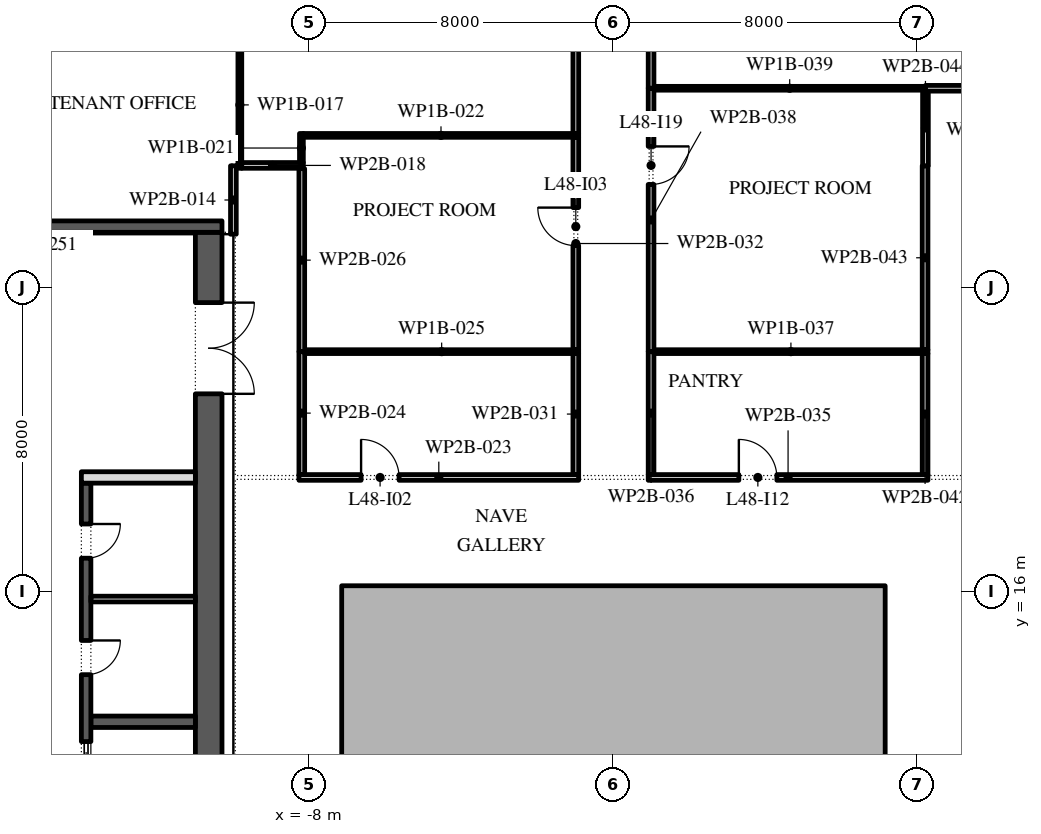
"""IFC4 building model, lengths in metres.
Left out: names, types, materials, properties, quantities, classifications, styles, units other than length and angle.
Written with IfcOpenShell. Run it as: python <this file> out.ifc"""

import sys

from ifc_helpers import new_model, si_unit, direction, frame, frame_2d, origin, place, context, subcontext, project, spatial, polyline, rectangle, outline, extrude, element, fill, save


model = new_model("IFC4")
c1 = context("Model", 3, precision=1e-05, world=origin(), true_north=direction((0.0, 1.0)))
c2 = subcontext(c1, "Body", "Model", "MODEL_VIEW")
j1 = project(units=[si_unit("LENGTHUNIT", "METRE"), si_unit("PLANEANGLEUNIT", "RADIAN")], contexts=[c1])
p1 = place(None, origin())
s1 = spatial("IfcSite", under=j1, at=p1, CompositionType="ELEMENT")
p2 = place(p1, origin())
s2 = spatial("IfcBuilding", under=s1, at=p2, CompositionType="ELEMENT")
p3 = place(p2, frame((0.0, 0.0, 217.8)))
s3 = spatial("IfcBuildingStorey", under=s2, at=p3, CompositionType="ELEMENT", Elevation=217.8)
p4 = place(p3, origin())
e1 = element("IfcWall", 1, at=p4, inside=s3, PredefinedType="STANDARD", context=c2, shape_type="SweptSolid", body=[
    extrude(outline(polyline([(-7.15, -2.15), (7.15, -2.15), (7.15, 16.15), (-7.15, 16.15), (-7.15, -2.15)]), holes=[polyline([(-7.0, -2.0), (-7.0, 16.0), (7.0, 16.0), (7.0, -2.0), (-7.0, -2.0)])]), origin(), (0.0, 0.0, 1.0), 3.95),
])
p5 = place(p3, frame((-10.65, -2.45, 0.0), z_axis=(0.0, 0.0, 1.0), x_axis=(0.0, 1.0, 0.0)))
e2 = element("IfcWall", 2, at=p5, inside=s3, PredefinedType="SHEAR", context=c2, shape_type="SweptSolid", body=[
    extrude(rectangle(XDim=27.9, YDim=0.7, at=frame_2d((13.95, 0.0))), origin(), (0.0, 0.0, 1.0), 3.95),
])
p6 = place(p5, frame((23.65, 0.0, 0.0)))
e3 = element("IfcOpeningElement", 3, at=p6, cuts=e2, PredefinedType="OPENING", context=c2, shape_type="SweptSolid", body=[
    extrude(rectangle(XDim=2.4, YDim=2.1, at=frame_2d((1.2, 1.05))), frame((0.0, 0.36, 0.0), z_axis=(0.0, -1.0, 0.0), x_axis=(1.0, 0.0, 0.0)), (0.0, 0.0, 1.0), 0.72),
])
p7 = place(p5, frame((1.087, 0.0, 0.0)))
e4 = element("IfcOpeningElement", 4, at=p7, cuts=e2, PredefinedType="OPENING", context=c2, shape_type="SweptSolid", body=[
    extrude(rectangle(XDim=0.9, YDim=2.1, at=frame_2d((0.45, 1.05))), frame((0.0, 0.36, 0.0), z_axis=(0.0, -1.0, 0.0), x_axis=(1.0, 0.0, 0.0)), (0.0, 0.0, 1.0), 0.72),
])
p8 = place(p5, frame((4.262, 0.0, 0.0)))
e5 = element("IfcOpeningElement", 5, at=p8, cuts=e2, PredefinedType="OPENING", context=c2, shape_type="SweptSolid", body=[
    extrude(rectangle(XDim=1.0, YDim=2.1, at=frame_2d((0.5, 1.05))), frame((0.0, 0.36, 0.0), z_axis=(0.0, -1.0, 0.0), x_axis=(1.0, 0.0, 0.0)), (0.0, 0.0, 1.0), 0.72),
])
p9 = place(p3, frame((-21.7, 25.6, 0.0), z_axis=(0.0, 0.0, 1.0), x_axis=(1.0, 0.0, 0.0)))
e6 = element("IfcWall", 6, at=p9, inside=s3, PredefinedType="SHEAR", context=c2, shape_type="SweptSolid", body=[
    extrude(rectangle(XDim=11.4, YDim=0.3, at=frame_2d((5.7, 0.0))), origin(), (0.0, 0.0, 1.0), 3.95),
])
p10 = place(p3, frame((-13.75, 12.571, 0.0), z_axis=(0.0, 0.0, 1.0), x_axis=(1.0, 0.0, 0.0)))
e7 = element("IfcWall", 7, at=p10, inside=s3, PredefinedType="SHEAR", context=c2, shape_type="SweptSolid", body=[
    extrude(rectangle(XDim=2.75, YDim=0.3, at=frame_2d((1.375, 0.0))), origin(), (0.0, 0.0, 1.0), 3.95),
])
p11 = place(p3, frame((-13.875, -2.45, 0.0), z_axis=(0.0, 0.0, 1.0), x_axis=(0.0, 1.0, 0.0)))
e8 = element("IfcWall", 8, at=p11, inside=s3, PredefinedType="SHEAR", context=c2, shape_type="SweptSolid", body=[
    extrude(rectangle(XDim=21.3, YDim=0.25, at=frame_2d((10.65, 0.0))), origin(), (0.0, 0.0, 1.0), 3.95),
])
p12 = place(p11, frame((16.261, 0.0, 0.0)))
e9 = element("IfcOpeningElement", 9, at=p12, cuts=e8, PredefinedType="OPENING", context=c2, shape_type="SweptSolid", body=[
    extrude(rectangle(XDim=0.9, YDim=2.1, at=frame_2d((0.45, 1.05))), frame((0.0, 0.135, 0.0), z_axis=(0.0, -1.0, 0.0), x_axis=(1.0, 0.0, 0.0)), (0.0, 0.0, 1.0), 0.27),
])
p13 = place(p11, frame((19.325, 0.0, 0.0)))
e10 = element("IfcOpeningElement", 10, at=p13, cuts=e8, PredefinedType="OPENING", context=c2, shape_type="SweptSolid", body=[
    extrude(rectangle(XDim=0.9, YDim=2.1, at=frame_2d((0.45, 1.05))), frame((0.0, 0.135, 0.0), z_axis=(0.0, -1.0, 0.0), x_axis=(1.0, 0.0, 0.0)), (0.0, 0.0, 1.0), 0.27),
])
p14 = place(p11, frame((6.971, 0.0, 0.0)))
e11 = element("IfcOpeningElement", 11, at=p14, cuts=e8, PredefinedType="OPENING", context=c2, shape_type="SweptSolid", body=[
    extrude(rectangle(XDim=1.1, YDim=2.1, at=frame_2d((0.55, 1.05))), frame((0.0, 0.135, 0.0), z_axis=(0.0, -1.0, 0.0), x_axis=(1.0, 0.0, 0.0)), (0.0, 0.0, 1.0), 0.27),
])
p15 = place(p11, frame((9.114, 0.0, 0.0)))
e12 = element("IfcOpeningElement", 12, at=p15, cuts=e8, PredefinedType="OPENING", context=c2, shape_type="SweptSolid", body=[
    extrude(rectangle(XDim=1.1, YDim=2.1, at=frame_2d((0.55, 1.05))), frame((0.0, 0.135, 0.0), z_axis=(0.0, -1.0, 0.0), x_axis=(1.0, 0.0, 0.0)), (0.0, 0.0, 1.0), 0.27),
])
p16 = place(p11, frame((11.257, 0.0, 0.0)))
e13 = element("IfcOpeningElement", 13, at=p16, cuts=e8, PredefinedType="OPENING", context=c2, shape_type="SweptSolid", body=[
    extrude(rectangle(XDim=1.1, YDim=2.1, at=frame_2d((0.55, 1.05))), frame((0.0, 0.135, 0.0), z_axis=(0.0, -1.0, 0.0), x_axis=(1.0, 0.0, 0.0)), (0.0, 0.0, 1.0), 0.27),
])
p17 = place(p11, frame((13.4, 0.0, 0.0)))
e14 = element("IfcOpeningElement", 14, at=p17, cuts=e8, PredefinedType="OPENING", context=c2, shape_type="SweptSolid", body=[
    extrude(rectangle(XDim=1.1, YDim=2.1, at=frame_2d((0.55, 1.05))), frame((0.0, 0.135, 0.0), z_axis=(0.0, -1.0, 0.0), x_axis=(1.0, 0.0, 0.0)), (0.0, 0.0, 1.0), 0.27),
])
p18 = place(p3, frame((-14.0, 19.0, 0.0), z_axis=(0.0, 0.0, 1.0), x_axis=(1.0, 0.0, 0.0)))
e15 = element("IfcWall", 15, at=p18, inside=s3, PredefinedType="PARTITIONING", context=c2, shape_type="SweptSolid", body=[
    extrude(rectangle(XDim=3.0, YDim=0.3, at=frame_2d((1.5, 0.0))), origin(), (0.0, 0.0, 1.0), 3.95),
])
p19 = place(p3, frame((-13.75, 15.8, 0.0), z_axis=(0.0, 0.0, 1.0), x_axis=(1.0, 0.0, 0.0)))
e16 = element("IfcWall", 16, at=p19, inside=s3, PredefinedType="PARTITIONING", context=c2, shape_type="SweptSolid", body=[
    extrude(rectangle(XDim=2.75, YDim=0.15, at=frame_2d((1.375, 0.0))), origin(), (0.0, 0.0, 1.0), 3.95),
])
p20 = place(p3, frame((-10.0, 25.4, 0.0), z_axis=(0.0, 0.0, 1.0), x_axis=(0.0, 1.0, 0.0)))
e17 = element("IfcWall", 17, at=p20, inside=s3, PredefinedType="PARTITIONING", context=c2, shape_type="SweptSolid", body=[
    extrude(rectangle(XDim=1.8, YDim=0.15, at=frame_2d((0.9, 0.0))), origin(), (0.0, 0.0, 1.0), 3.95),
])
p21 = place(p3, frame((-9.83, 27.135, 0.0), z_axis=(0.0, 0.0, 1.0), x_axis=(0.0, 1.0, 0.0)))
e18 = element("IfcWall", 18, at=p21, inside=s3, PredefinedType="PARTITIONING", context=c2, shape_type="SweptSolid", body=[
    extrude(rectangle(XDim=3.335, YDim=0.1, at=frame_2d((1.667, 0.0))), origin(), (0.0, 0.0, 1.0), 3.95),
])
p22 = place(p3, frame((-9.78, 27.21, 0.0), z_axis=(0.0, 0.0, 1.0), x_axis=(1.0, 0.0, 0.0)))
e19 = element("IfcWall", 19, at=p22, inside=s3, PredefinedType="PARTITIONING", context=c2, shape_type="SweptSolid", body=[
    extrude(rectangle(XDim=1.62, YDim=0.15, at=frame_2d((0.81, 0.0))), origin(), (0.0, 0.0, 1.0), 3.95),
])
p23 = place(p3, frame((-8.21, 27.285, 0.0), z_axis=(0.0, 0.0, 1.0), x_axis=(0.0, 1.0, 0.0)))
e20 = element("IfcWall", 20, at=p23, inside=s3, PredefinedType="PARTITIONING", context=c2, shape_type="SweptSolid", body=[
    extrude(rectangle(XDim=0.765, YDim=0.1, at=frame_2d((0.383, 0.0))), origin(), (0.0, 0.0, 1.0), 3.95),
])
p24 = place(p3, frame((-8.16, 28.0, 0.0), z_axis=(0.0, 0.0, 1.0), x_axis=(1.0, 0.0, 0.0)))
e21 = element("IfcWall", 21, at=p24, inside=s3, PredefinedType="PARTITIONING", context=c2, shape_type="SweptSolid", body=[
    extrude(rectangle(XDim=7.245, YDim=0.1, at=frame_2d((3.623, 0.0))), origin(), (0.0, 0.0, 1.0), 3.95),
])
p25 = place(p3, frame((-8.275, 19.0, 0.0), z_axis=(0.0, 0.0, 1.0), x_axis=(1.0, 0.0, 0.0)))
e22 = element("IfcWall", 22, at=p25, inside=s3, PredefinedType="PARTITIONING", context=c2, shape_type="SweptSolid", body=[
    extrude(rectangle(XDim=7.36, YDim=0.15, at=frame_2d((3.68, 0.0))), origin(), (0.0, 0.0, 1.0), 3.95),
])
p26 = place(p25, frame((1.635, 0.0, 0.0)))
e23 = element("IfcOpeningElement", 23, at=p26, cuts=e22, PredefinedType="OPENING", context=c2, shape_type="SweptSolid", body=[
    extrude(rectangle(XDim=1.0, YDim=2.1, at=frame_2d((0.5, 1.05))), frame((0.0, 0.085, 0.0), z_axis=(0.0, -1.0, 0.0), x_axis=(1.0, 0.0, 0.0)), (0.0, 0.0, 1.0), 0.17),
])
p27 = place(p3, frame((-8.2, 22.31, 0.0), z_axis=(0.0, 0.0, 1.0), x_axis=(0.0, -1.0, 0.0)))
e24 = element("IfcWall", 24, at=p27, inside=s3, PredefinedType="PARTITIONING", context=c2, shape_type="SweptSolid", body=[
    extrude(rectangle(XDim=3.235, YDim=0.15, at=frame_2d((1.618, 0.0))), origin(), (0.0, 0.0, 1.0), 3.95),
])
p28 = place(p3, frame((-8.125, 22.31, 0.0), z_axis=(0.0, 0.0, 1.0), x_axis=(1.0, 0.0, 0.0)))
e25 = element("IfcWall", 25, at=p28, inside=s3, PredefinedType="PARTITIONING", context=c2, shape_type="SweptSolid", body=[
    extrude(rectangle(XDim=7.21, YDim=0.1, at=frame_2d((3.605, 0.0))), origin(), (0.0, 0.0, 1.0), 3.95),
])
p29 = place(p3, frame((-8.2, 27.125, 0.0), z_axis=(0.0, 0.0, 1.0), x_axis=(0.0, -1.0, 0.0)))
e26 = element("IfcWall", 26, at=p29, inside=s3, PredefinedType="PARTITIONING", context=c2, shape_type="SweptSolid", body=[
    extrude(rectangle(XDim=4.815, YDim=0.15, at=frame_2d((2.407, 0.0))), origin(), (0.0, 0.0, 1.0), 3.95),
])
p30 = place(p3, frame((-0.99, 19.075, 0.0), z_axis=(0.0, 0.0, 1.0), x_axis=(0.0, 1.0, 0.0)))
e27 = element("IfcWall", 27, at=p30, inside=s3, PredefinedType="PARTITIONING", context=c2, shape_type="SweptSolid", body=[
    extrude(rectangle(XDim=3.185, YDim=0.15, at=frame_2d((1.593, 0.0))), origin(), (0.0, 0.0, 1.0), 3.95),
])
p31 = place(p3, frame((-0.99, 22.36, 0.0), z_axis=(0.0, 0.0, 1.0), x_axis=(0.0, 1.0, 0.0)))
e28 = element("IfcWall", 28, at=p31, inside=s3, PredefinedType="PARTITIONING", context=c2, shape_type="SweptSolid", body=[
    extrude(rectangle(XDim=5.59, YDim=0.15, at=frame_2d((2.795, 0.0))), origin(), (0.0, 0.0, 1.0), 3.95),
])
p32 = place(p31, frame((2.74, 0.0, 0.0)))
e29 = element("IfcOpeningElement", 29, at=p32, cuts=e28, PredefinedType="OPENING", context=c2, shape_type="SweptSolid", body=[
    extrude(rectangle(XDim=1.0, YDim=2.1, at=frame_2d((0.5, 1.05))), frame((0.0, 0.085, 0.0), z_axis=(0.0, -1.0, 0.0), x_axis=(1.0, 0.0, 0.0)), (0.0, 0.0, 1.0), 0.17),
])
p33 = place(p3, frame((-0.99, 28.05, 0.0), z_axis=(0.0, 0.0, 1.0), x_axis=(0.0, 1.0, 0.0)))
e30 = element("IfcWall", 30, at=p33, inside=s3, PredefinedType="PARTITIONING", context=c2, shape_type="SweptSolid", body=[
    extrude(rectangle(XDim=13.246, YDim=0.15, at=frame_2d((6.623, 0.0))), origin(), (0.0, 0.0, 1.0), 3.95),
])
p34 = place(p33, frame((6.32, 0.0, 0.0)))
e31 = element("IfcOpeningElement", 31, at=p34, cuts=e30, PredefinedType="OPENING", context=c2, shape_type="SweptSolid", body=[
    extrude(rectangle(XDim=1.0, YDim=2.1, at=frame_2d((0.5, 1.05))), frame((0.0, 0.085, 0.0), z_axis=(0.0, -1.0, 0.0), x_axis=(1.0, 0.0, 0.0)), (0.0, 0.0, 1.0), 0.17),
])
p35 = place(p3, frame((0.915, 19.0, 0.0), z_axis=(0.0, 0.0, 1.0), x_axis=(1.0, 0.0, 0.0)))
e32 = element("IfcWall", 32, at=p35, inside=s3, PredefinedType="PARTITIONING", context=c2, shape_type="SweptSolid", body=[
    extrude(rectangle(XDim=7.36, YDim=0.15, at=frame_2d((3.68, 0.0))), origin(), (0.0, 0.0, 1.0), 3.95),
])
p36 = place(p35, frame((2.385, 0.0, 0.0)))
e33 = element("IfcOpeningElement", 33, at=p36, cuts=e32, PredefinedType="OPENING", context=c2, shape_type="SweptSolid", body=[
    extrude(rectangle(XDim=1.0, YDim=2.1, at=frame_2d((0.5, 1.05))), frame((0.0, 0.085, 0.0), z_axis=(0.0, -1.0, 0.0), x_axis=(1.0, 0.0, 0.0)), (0.0, 0.0, 1.0), 0.17),
])
p37 = place(p3, frame((0.99, 22.31, 0.0), z_axis=(0.0, 0.0, 1.0), x_axis=(0.0, -1.0, 0.0)))
e34 = element("IfcWall", 34, at=p37, inside=s3, PredefinedType="PARTITIONING", context=c2, shape_type="SweptSolid", body=[
    extrude(rectangle(XDim=3.235, YDim=0.15, at=frame_2d((1.618, 0.0))), origin(), (0.0, 0.0, 1.0), 3.95),
])
p38 = place(p3, frame((1.065, 22.31, 0.0), z_axis=(0.0, 0.0, 1.0), x_axis=(1.0, 0.0, 0.0)))
e35 = element("IfcWall", 35, at=p38, inside=s3, PredefinedType="PARTITIONING", context=c2, shape_type="SweptSolid", body=[
    extrude(rectangle(XDim=7.21, YDim=0.1, at=frame_2d((3.605, 0.0))), origin(), (0.0, 0.0, 1.0), 3.95),
])
p39 = place(p3, frame((0.99, 29.24, 0.0), z_axis=(0.0, 0.0, 1.0), x_axis=(0.0, -1.0, 0.0)))
e36 = element("IfcWall", 36, at=p39, inside=s3, PredefinedType="PARTITIONING", context=c2, shape_type="SweptSolid", body=[
    extrude(rectangle(XDim=6.93, YDim=0.15, at=frame_2d((3.465, 0.0))), origin(), (0.0, 0.0, 1.0), 3.95),
])
p40 = place(p39, frame((1.53, 0.0, 0.0)))
e37 = element("IfcOpeningElement", 37, at=p40, cuts=e36, PredefinedType="OPENING", context=c2, shape_type="SweptSolid", body=[
    extrude(rectangle(XDim=1.0, YDim=2.1, at=frame_2d((0.5, 1.05))), frame((0.0, 0.085, 0.0), z_axis=(0.0, -1.0, 0.0), x_axis=(1.0, 0.0, 0.0)), (0.0, 0.0, 1.0), 0.17),
])
p41 = place(p3, frame((1.065, 29.24, 0.0), z_axis=(0.0, 0.0, 1.0), x_axis=(1.0, 0.0, 0.0)))
e38 = element("IfcWall", 38, at=p41, inside=s3, PredefinedType="PARTITIONING", context=c2, shape_type="SweptSolid", body=[
    extrude(rectangle(XDim=7.145, YDim=0.1, at=frame_2d((3.573, 0.0))), origin(), (0.0, 0.0, 1.0), 3.95),
])
p42 = place(p3, frame((0.99, 40.05, 0.0), z_axis=(0.0, 0.0, 1.0), x_axis=(0.0, -1.0, 0.0)))
e39 = element("IfcWall", 39, at=p42, inside=s3, PredefinedType="PARTITIONING", context=c2, shape_type="SweptSolid", body=[
    extrude(rectangle(XDim=10.81, YDim=0.15, at=frame_2d((5.405, 0.0))), origin(), (0.0, 0.0, 1.0), 3.95),
])
p43 = place(p42, frame((5.91, 0.0, 0.0)))
e40 = element("IfcOpeningElement", 40, at=p43, cuts=e39, PredefinedType="OPENING", context=c2, shape_type="SweptSolid", body=[
    extrude(rectangle(XDim=1.0, YDim=2.1, at=frame_2d((0.5, 1.05))), frame((0.0, 0.085, 0.0), z_axis=(0.0, -1.0, 0.0), x_axis=(1.0, 0.0, 0.0)), (0.0, 0.0, 1.0), 0.17),
])
p44 = place(p3, frame((8.2, 19.075, 0.0), z_axis=(0.0, 0.0, 1.0), x_axis=(0.0, 1.0, 0.0)))
e41 = element("IfcWall", 41, at=p44, inside=s3, PredefinedType="PARTITIONING", context=c2, shape_type="SweptSolid", body=[
    extrude(rectangle(XDim=3.185, YDim=0.15, at=frame_2d((1.593, 0.0))), origin(), (0.0, 0.0, 1.0), 3.95),
])
p45 = place(p3, frame((8.2, 22.36, 0.0), z_axis=(0.0, 0.0, 1.0), x_axis=(0.0, 1.0, 0.0)))
e42 = element("IfcWall", 42, at=p45, inside=s3, PredefinedType="PARTITIONING", context=c2, shape_type="SweptSolid", body=[
    extrude(rectangle(XDim=4.84, YDim=0.15, at=frame_2d((2.42, 0.0))), origin(), (0.0, 0.0, 1.0), 3.95),
])
p46 = place(p3, frame((8.21, 27.2, 0.0), z_axis=(0.0, 0.0, 1.0), x_axis=(0.0, 1.0, 0.0)))
e43 = element("IfcWall", 43, at=p46, inside=s3, PredefinedType="PARTITIONING", context=c2, shape_type="SweptSolid", body=[
    extrude(rectangle(XDim=1.99, YDim=0.15, at=frame_2d((0.995, 0.0))), origin(), (0.0, 0.0, 1.0), 3.95),
])
p47 = place(p3, frame((8.21, 29.24, 0.0), z_axis=(0.0, 0.0, 1.0), x_axis=(1.0, 0.0, 0.0)))
e44 = element("IfcWall", 44, at=p47, inside=s3, PredefinedType="PARTITIONING", context=c2, shape_type="SweptSolid", body=[
    extrude(rectangle(XDim=3.365, YDim=0.15, at=frame_2d((1.683, 0.0))), origin(), (0.0, 0.0, 1.0), 3.95),
])
p48 = place(p12, frame((0.9, -0.2, 0.0), z_axis=(0.0, 0.0, 1.0), x_axis=(-1.0, 0.0, 0.0)))
e45 = element("IfcDoor", 45, at=p48, inside=s3, OperationType="SINGLE_SWING_RIGHT", PredefinedType="DOOR", context=c2, shape_type="SweptSolid", body=[
    extrude(rectangle(XDim=0.9, YDim=2.1, at=frame_2d((0.45, 1.05))), frame((0.0, -0.075, 0.0), z_axis=(0.0, -1.0, 0.0), x_axis=(1.0, 0.0, 0.0)), (0.0, 0.0, 1.0), 0.05),
])
fill(e9, e45)
p49 = place(p13, frame((0.9, -0.2, 0.0), z_axis=(0.0, 0.0, 1.0), x_axis=(-1.0, 0.0, 0.0)))
e46 = element("IfcDoor", 46, at=p49, inside=s3, OperationType="SINGLE_SWING_RIGHT", PredefinedType="DOOR", context=c2, shape_type="SweptSolid", body=[
    extrude(rectangle(XDim=0.9, YDim=2.1, at=frame_2d((0.45, 1.05))), frame((0.0, -0.075, 0.0), z_axis=(0.0, -1.0, 0.0), x_axis=(1.0, 0.0, 0.0)), (0.0, 0.0, 1.0), 0.05),
])
fill(e10, e46)
p50 = place(p17, origin())
e47 = element("IfcDoor", 47, at=p50, inside=s3, OperationType="SLIDING_TO_LEFT", PredefinedType="DOOR", context=c2, shape_type="SweptSolid", body=[
    extrude(rectangle(XDim=1.1, YDim=2.1, at=frame_2d((0.55, 1.05))), frame((0.0, 0.025, 0.0), z_axis=(0.0, -1.0, 0.0), x_axis=(1.0, 0.0, 0.0)), (0.0, 0.0, 1.0), 0.05),
])
fill(e14, e47)
p51 = place(p6, frame((2.4, 0.0, 0.0), z_axis=(0.0, 0.0, 1.0), x_axis=(-1.0, 0.0, 0.0)))
e48 = element("IfcDoor", 48, at=p51, inside=s3, OperationType="DOUBLE_DOOR_SINGLE_SWING", PredefinedType="DOOR", context=c2, shape_type="SweptSolid", body=[
    extrude(rectangle(XDim=2.4, YDim=2.1, at=frame_2d((1.2, 1.05))), frame((0.0, 0.025, 0.0), z_axis=(0.0, -1.0, 0.0), x_axis=(1.0, 0.0, 0.0)), (0.0, 0.0, 1.0), 0.05),
])
fill(e3, e48)
p52 = place(p26, origin())
e49 = element("IfcDoor", 49, at=p52, inside=s3, OperationType="SINGLE_SWING_RIGHT", PredefinedType="DOOR", context=c2, shape_type="SweptSolid", body=[
    extrude(rectangle(XDim=1.0, YDim=2.1, at=frame_2d((0.5, 1.05))), frame((0.0, 0.025, 0.0), z_axis=(0.0, -1.0, 0.0), x_axis=(1.0, 0.0, 0.0)), (0.0, 0.0, 1.0), 0.05),
])
fill(e23, e49)
p53 = place(p32, origin())
e50 = element("IfcDoor", 50, at=p53, inside=s3, OperationType="SINGLE_SWING_LEFT", PredefinedType="DOOR", context=c2, shape_type="SweptSolid", body=[
    extrude(rectangle(XDim=1.0, YDim=2.1, at=frame_2d((0.5, 1.05))), frame((0.0, 0.025, 0.0), z_axis=(0.0, -1.0, 0.0), x_axis=(1.0, 0.0, 0.0)), (0.0, 0.0, 1.0), 0.05),
])
fill(e29, e50)
p54 = place(p36, origin())
e51 = element("IfcDoor", 51, at=p54, inside=s3, OperationType="SINGLE_SWING_RIGHT", PredefinedType="DOOR", context=c2, shape_type="SweptSolid", body=[
    extrude(rectangle(XDim=1.0, YDim=2.1, at=frame_2d((0.5, 1.05))), frame((0.0, 0.025, 0.0), z_axis=(0.0, -1.0, 0.0), x_axis=(1.0, 0.0, 0.0)), (0.0, 0.0, 1.0), 0.05),
])
fill(e33, e51)
p55 = place(p40, origin())
e52 = element("IfcDoor", 52, at=p55, inside=s3, OperationType="SINGLE_SWING_RIGHT", PredefinedType="DOOR", context=c2, shape_type="SweptSolid", body=[
    extrude(rectangle(XDim=1.0, YDim=2.1, at=frame_2d((0.5, 1.05))), frame((0.0, 0.025, 0.0), z_axis=(0.0, -1.0, 0.0), x_axis=(1.0, 0.0, 0.0)), (0.0, 0.0, 1.0), 0.05),
])
fill(e37, e52)
save(model, sys.argv[1])
